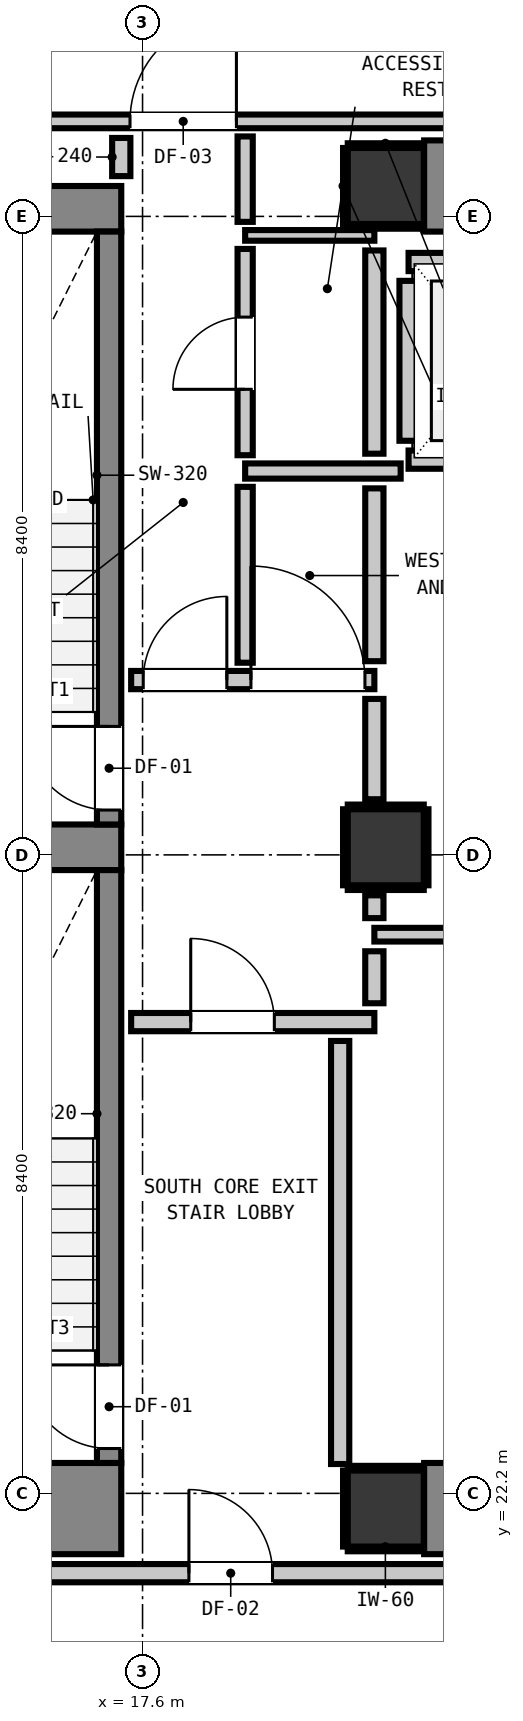
"""IFC4 building model, lengths in metres.
Left out: names, types, materials, properties, quantities, classifications, styles, units other than length and angle.
Written with IfcOpenShell. Run it as: python <this file> out.ifc"""

import sys

from ifc_helpers import new_model, si_unit, direction, frame, frame_2d, origin, origin_2d, place, context, subcontext, project, spatial, rectangle, extrude, element, fill, save


model = new_model("IFC4")
c1 = context("Model", 3, precision=1e-05, world=origin(), true_north=direction((0.0, 1.0)))
c2 = subcontext(c1, "Body", "Model", "MODEL_VIEW")
j1 = project(units=[si_unit("LENGTHUNIT", "METRE"), si_unit("PLANEANGLEUNIT", "RADIAN")], contexts=[c1])
p1 = place(None, origin())
s1 = spatial("IfcSite", under=j1, at=p1, CompositionType="ELEMENT")
p2 = place(p1, origin())
s2 = spatial("IfcBuilding", under=s1, at=p2, CompositionType="ELEMENT")
p3 = place(p2, frame((0.0, 0.0, 51.88)))
s3 = spatial("IfcBuildingStorey", under=s2, at=p3, CompositionType="ELEMENT", Elevation=51.88)
for number, where, z_axis, x_axis in (
    (1, (20.8, 22.0, 0.0), (0.0, 0.0, 1.0), (1.0, 0.0, 0.0)),
    (2, (20.8, 39.4, 0.0), (0.0, 0.0, 1.0), (1.0, 0.0, 0.0)),
):
    element("IfcColumn", number, at=place(p3, frame(where, z_axis=z_axis, x_axis=x_axis)), inside=s3, PredefinedType="COLUMN", context=c2, shape_type="SweptSolid", body=[
        extrude(rectangle(XDim=1.0, YDim=1.0, at=origin_2d()), origin(), (0.0, 0.0, 1.0), 3.32),
    ])
p4 = place(p3, frame((13.24, 22.0, 0.0), z_axis=(0.0, 0.0, 1.0), x_axis=(1.0, 0.0, 0.0)))
e3 = element("IfcWall", 3, at=p4, inside=s3, PredefinedType="SHEAR", context=c2, shape_type="SweptSolid", body=[
    extrude(rectangle(XDim=4.08, YDim=1.2, at=frame_2d((2.04, 0.0))), origin(), (0.0, 0.0, 1.0), 3.32),
])
p5 = place(p3, frame((13.24, 39.1, 0.0), z_axis=(0.0, 0.0, 1.0), x_axis=(1.0, 0.0, 0.0)))
e4 = element("IfcWall", 4, at=p5, inside=s3, PredefinedType="SHEAR", context=c2, shape_type="SweptSolid", body=[
    extrude(rectangle(XDim=4.08, YDim=0.6, at=frame_2d((2.04, 0.0))), origin(), (0.0, 0.0, 1.0), 3.32),
])
p6 = place(p3, frame((13.905, 30.7, 0.0), z_axis=(0.0, 0.0, 1.0), x_axis=(1.0, 0.0, 0.0)))
e5 = element("IfcWall", 5, at=p6, inside=s3, PredefinedType="SHEAR", context=c2, shape_type="SweptSolid", body=[
    extrude(rectangle(XDim=3.415, YDim=0.6, at=frame_2d((1.708, 0.0))), origin(), (0.0, 0.0, 1.0), 3.32),
])
for number, where, z_axis, x_axis in (
    (6, (21.305, 22.0, 0.0), (0.0, 0.0, 1.0), (1.0, 0.0, 0.0)),
    (7, (21.305, 39.4, 0.0), (0.0, 0.0, 1.0), (1.0, 0.0, 0.0)),
):
    element("IfcWall", number, at=place(p3, frame(where, z_axis=z_axis, x_axis=x_axis)), inside=s3, PredefinedType="SHEAR", context=c2, shape_type="SweptSolid", body=[
        extrude(rectangle(XDim=7.39, YDim=1.2, at=frame_2d((3.695, 0.0))), origin(), (0.0, 0.0, 1.0), 3.32),
    ])
p7 = place(p3, frame((17.16, 31.0, 0.0), z_axis=(0.0, 0.0, 1.0), x_axis=(0.0, 1.0, 0.0)))
e8 = element("IfcWall", 8, at=p7, inside=s3, PredefinedType="SHEAR", context=c2, shape_type="SweptSolid", body=[
    extrude(rectangle(XDim=7.8, YDim=0.32, at=frame_2d((3.9, 0.0))), origin(), (0.0, 0.0, 1.0), 3.32),
])
p8 = place(p7, frame((0.19, 0.0, 0.0)))
e9 = element("IfcOpeningElement", 9, at=p8, cuts=e8, PredefinedType="OPENING", context=c2, shape_type="SweptSolid", body=[
    extrude(rectangle(XDim=1.1, YDim=2.15, at=frame_2d((0.55, 1.075))), frame((0.0, 0.17, 0.0), z_axis=(0.0, -1.0, 0.0), x_axis=(1.0, 0.0, 0.0)), (0.0, 0.0, 1.0), 0.34),
])
p9 = place(p3, frame((17.16, 22.6, 0.0), z_axis=(0.0, 0.0, 1.0), x_axis=(0.0, 1.0, 0.0)))
e10 = element("IfcWall", 10, at=p9, inside=s3, PredefinedType="SHEAR", context=c2, shape_type="SweptSolid", body=[
    extrude(rectangle(XDim=7.8, YDim=0.32, at=frame_2d((3.9, 0.0))), origin(), (0.0, 0.0, 1.0), 3.32),
])
p10 = place(p9, frame((0.19, 0.0, 0.0)))
e11 = element("IfcOpeningElement", 11, at=p10, cuts=e10, PredefinedType="OPENING", context=c2, shape_type="SweptSolid", body=[
    extrude(rectangle(XDim=1.1, YDim=2.15, at=frame_2d((0.55, 1.075))), frame((0.0, 0.17, 0.0), z_axis=(0.0, -1.0, 0.0), x_axis=(1.0, 0.0, 0.0)), (0.0, 0.0, 1.0), 0.34),
])
p11 = place(p3, frame((20.8, 30.7, 0.0), z_axis=(0.0, 0.0, 1.0), x_axis=(1.0, 0.0, 0.0)))
e12 = element("IfcColumn", 12, at=p11, inside=s3, PredefinedType="COLUMN", context=c2, shape_type="SweptSolid", body=[
    extrude(rectangle(XDim=1.0, YDim=1.0, at=origin_2d()), origin(), (0.0, 0.0, 1.0), 3.32),
])
for number, where, z_axis, x_axis in (
    (13, (21.1, 35.8, 0.0), (0.0, 0.0, 1.0), (1.0, 0.0, 0.0)),
    (14, (21.1, 38.4, 0.0), (0.0, 0.0, 1.0), (1.0, 0.0, 0.0)),
):
    element("IfcWall", number, at=place(p3, frame(where, z_axis=z_axis, x_axis=x_axis)), inside=s3, PredefinedType="PARTITIONING", context=c2, shape_type="SweptSolid", body=[
        extrude(rectangle(XDim=2.2, YDim=0.24, at=frame_2d((1.1, 0.0))), origin(), (0.0, 0.0, 1.0), 3.06),
    ])
p12 = place(p3, frame((21.1, 36.048, 0.0), z_axis=(0.0, 0.0, 1.0), x_axis=(0.0, 1.0, 0.0)))
e15 = element("IfcWall", 15, at=p12, inside=s3, PredefinedType="PARTITIONING", context=c2, shape_type="SweptSolid", body=[
    extrude(rectangle(XDim=2.104, YDim=0.24, at=frame_2d((1.052, 0.0))), origin(), (0.0, 0.0, 1.0), 2.295),
])
p13 = place(p3, frame((10.15, 21.15, 0.0), z_axis=(0.0, 0.0, 1.0), x_axis=(1.0, 0.0, 0.0)))
e16 = element("IfcWall", 16, at=p13, inside=s3, PredefinedType="PARTITIONING", context=c2, shape_type="SweptSolid", body=[
    extrude(rectangle(XDim=40.023, YDim=0.24, at=frame_2d((20.012, 0.0))), origin(), (0.0, 0.0, 1.0), 3.06),
])
p14 = place(p13, frame((8.06, 0.0, 0.0)))
e17 = element("IfcOpeningElement", 17, at=p14, cuts=e16, PredefinedType="OPENING", context=c2, shape_type="SweptSolid", body=[
    extrude(rectangle(XDim=1.1, YDim=2.15, at=frame_2d((0.55, 1.075))), frame((0.0, 0.13, 0.0), z_axis=(0.0, -1.0, 0.0), x_axis=(1.0, 0.0, 0.0)), (0.0, 0.0, 1.0), 0.26),
])
p15 = place(p13, frame((0.324, 0.0, 0.0)))
e18 = element("IfcOpeningElement", 18, at=p15, cuts=e16, PredefinedType="OPENING", context=c2, shape_type="SweptSolid", body=[
    extrude(rectangle(XDim=1.4, YDim=2.15, at=frame_2d((0.7, 1.075))), frame((0.0, 0.13, 0.0), z_axis=(0.0, -1.0, 0.0), x_axis=(1.0, 0.0, 0.0)), (0.0, 0.0, 1.0), 0.26),
])
p16 = place(p13, frame((33.351, 0.0, 0.0)))
e19 = element("IfcOpeningElement", 19, at=p16, cuts=e16, PredefinedType="OPENING", context=c2, shape_type="SweptSolid", body=[
    extrude(rectangle(XDim=0.9, YDim=2.1, at=frame_2d((0.45, 1.05))), frame((0.0, 0.13, 0.0), z_axis=(0.0, -1.0, 0.0), x_axis=(1.0, 0.0, 0.0)), (0.0, 0.0, 1.0), 0.26),
])
p17 = place(p3, frame((17.45, 28.4, 0.0), z_axis=(0.0, 0.0, 1.0), x_axis=(1.0, 0.0, 0.0)))
e20 = element("IfcWall", 20, at=p17, inside=s3, PredefinedType="PARTITIONING", context=c2, shape_type="SweptSolid", body=[
    extrude(rectangle(XDim=3.2, YDim=0.24, at=frame_2d((1.6, 0.0))), origin(), (0.0, 0.0, 1.0), 3.06),
])
p18 = place(p17, frame((0.784, 0.0, 0.0)))
e21 = element("IfcOpeningElement", 21, at=p18, cuts=e20, PredefinedType="OPENING", context=c2, shape_type="SweptSolid", body=[
    extrude(rectangle(XDim=1.1, YDim=2.15, at=frame_2d((0.55, 1.075))), frame((0.0, 0.13, 0.0), z_axis=(0.0, -1.0, 0.0), x_axis=(1.0, 0.0, 0.0)), (0.0, 0.0, 1.0), 0.26),
])
p19 = place(p3, frame((17.45, 32.9, 0.0), z_axis=(0.0, 0.0, 1.0), x_axis=(1.0, 0.0, 0.0)))
e22 = element("IfcWall", 22, at=p19, inside=s3, PredefinedType="PARTITIONING", context=c2, shape_type="SweptSolid", body=[
    extrude(rectangle(XDim=3.2, YDim=0.24, at=frame_2d((1.6, 0.0))), origin(), (0.0, 0.0, 1.0), 3.06),
])
p20 = place(p19, frame((0.159, 0.0, 0.0)))
e23 = element("IfcOpeningElement", 23, at=p20, cuts=e22, PredefinedType="OPENING", context=c2, shape_type="SweptSolid", body=[
    extrude(rectangle(XDim=1.1, YDim=2.15, at=frame_2d((0.55, 1.075))), frame((0.0, 0.13, 0.0), z_axis=(0.0, -1.0, 0.0), x_axis=(1.0, 0.0, 0.0)), (0.0, 0.0, 1.0), 0.26),
])
p21 = place(p19, frame((1.576, 0.0, 0.0)))
e24 = element("IfcOpeningElement", 24, at=p21, cuts=e22, PredefinedType="OPENING", context=c2, shape_type="SweptSolid", body=[
    extrude(rectangle(XDim=1.5, YDim=2.15, at=frame_2d((0.75, 1.075))), frame((0.0, 0.13, 0.0), z_axis=(0.0, -1.0, 0.0), x_axis=(1.0, 0.0, 0.0)), (0.0, 0.0, 1.0), 0.26),
])
p22 = place(p3, frame((18.95, 35.65, 0.0), z_axis=(0.0, 0.0, 1.0), x_axis=(1.0, 0.0, 0.0)))
e25 = element("IfcWall", 25, at=p22, inside=s3, PredefinedType="PARTITIONING", context=c2, shape_type="SweptSolid", body=[
    extrude(rectangle(XDim=2.046, YDim=0.2, at=frame_2d((1.023, 0.0))), origin(), (0.0, 0.0, 1.0), 3.06),
])
p23 = place(p3, frame((20.65, 29.55, 0.0), z_axis=(0.0, 0.0, 1.0), x_axis=(1.0, 0.0, 0.0)))
e26 = element("IfcWall", 26, at=p23, inside=s3, PredefinedType="PARTITIONING", context=c2, shape_type="SweptSolid", body=[
    extrude(rectangle(XDim=9.325, YDim=0.18, at=frame_2d((4.663, 0.0))), origin(), (0.0, 0.0, 1.0), 3.06),
])
p24 = place(p3, frame((10.15, 40.25, 0.0), z_axis=(0.0, 0.0, 1.0), x_axis=(1.0, 0.0, 0.0)))
e27 = element("IfcWall", 27, at=p24, inside=s3, PredefinedType="PARTITIONING", context=c2, shape_type="SweptSolid", body=[
    extrude(rectangle(XDim=26.782, YDim=0.18, at=frame_2d((13.391, 0.0))), origin(), (0.0, 0.0, 1.0), 3.06),
])
p25 = place(p24, frame((7.285, 0.0, 0.0)))
e28 = element("IfcOpeningElement", 28, at=p25, cuts=e27, PredefinedType="OPENING", context=c2, shape_type="SweptSolid", body=[
    extrude(rectangle(XDim=1.4, YDim=2.15, at=frame_2d((0.7, 1.075))), frame((0.0, 0.1, 0.0), z_axis=(0.0, -1.0, 0.0), x_axis=(1.0, 0.0, 0.0)), (0.0, 0.0, 1.0), 0.2),
])
p26 = place(p24, frame((0.324, 0.0, 0.0)))
e29 = element("IfcOpeningElement", 29, at=p26, cuts=e27, PredefinedType="OPENING", context=c2, shape_type="SweptSolid", body=[
    extrude(rectangle(XDim=1.4, YDim=2.15, at=frame_2d((0.7, 1.075))), frame((0.0, 0.1, 0.0), z_axis=(0.0, -1.0, 0.0), x_axis=(1.0, 0.0, 0.0)), (0.0, 0.0, 1.0), 0.2),
])
p27 = place(p3, frame((18.95, 38.75, 0.0), z_axis=(0.0, 0.0, 1.0), x_axis=(1.0, 0.0, 0.0)))
e30 = element("IfcWall", 30, at=p27, inside=s3, PredefinedType="PARTITIONING", context=c2, shape_type="SweptSolid", body=[
    extrude(rectangle(XDim=1.7, YDim=0.14, at=frame_2d((0.85, 0.0))), origin(), (0.0, 0.0, 1.0), 3.06),
])
p28 = place(p3, frame((17.32, 39.53, 0.0), z_axis=(0.0, 0.0, 1.0), x_axis=(0.0, 1.0, 0.0)))
e31 = element("IfcWall", 31, at=p28, inside=s3, PredefinedType="PARTITIONING", context=c2, shape_type="SweptSolid", body=[
    extrude(rectangle(XDim=0.502, YDim=0.24, at=frame_2d((0.251, 0.0))), origin(), (0.0, 0.0, 1.0), 3.06),
])
p29 = place(p3, frame((20.2, 22.586, 0.0), z_axis=(0.0, 0.0, 1.0), x_axis=(0.0, 1.0, 0.0)))
e32 = element("IfcWall", 32, at=p29, inside=s3, PredefinedType="PARTITIONING", context=c2, shape_type="SweptSolid", body=[
    extrude(rectangle(XDim=5.566, YDim=0.24, at=frame_2d((2.783, 0.0))), origin(), (0.0, 0.0, 1.0), 3.06),
])
p30 = place(p3, frame((20.65, 28.648, 0.0), z_axis=(0.0, 0.0, 1.0), x_axis=(0.0, 1.0, 0.0)))
e33 = element("IfcWall", 33, at=p30, inside=s3, PredefinedType="PARTITIONING", context=c2, shape_type="SweptSolid", body=[
    extrude(rectangle(XDim=0.684, YDim=0.24, at=frame_2d((0.342, 0.0))), origin(), (0.0, 0.0, 1.0), 2.295),
])
p31 = place(p3, frame((20.65, 29.768, 0.0), z_axis=(0.0, 0.0, 1.0), x_axis=(0.0, 1.0, 0.0)))
e34 = element("IfcWall", 34, at=p31, inside=s3, PredefinedType="PARTITIONING", context=c2, shape_type="SweptSolid", body=[
    extrude(rectangle(XDim=0.3, YDim=0.24, at=frame_2d((0.15, 0.0))), origin(), (0.0, 0.0, 1.0), 2.295),
])
p32 = place(p3, frame((20.65, 31.332, 0.0), z_axis=(0.0, 0.0, 1.0), x_axis=(0.0, 1.0, 0.0)))
e35 = element("IfcWall", 35, at=p32, inside=s3, PredefinedType="PARTITIONING", context=c2, shape_type="SweptSolid", body=[
    extrude(rectangle(XDim=1.32, YDim=0.24, at=frame_2d((0.66, 0.0))), origin(), (0.0, 0.0, 1.0), 2.295),
])
p33 = place(p3, frame((20.65, 33.148, 0.0), z_axis=(0.0, 0.0, 1.0), x_axis=(0.0, 1.0, 0.0)))
e36 = element("IfcWall", 36, at=p33, inside=s3, PredefinedType="PARTITIONING", context=c2, shape_type="SweptSolid", body=[
    extrude(rectangle(XDim=2.274, YDim=0.24, at=frame_2d((1.137, 0.0))), origin(), (0.0, 0.0, 1.0), 2.295),
])
p34 = place(p3, frame((20.65, 35.878, 0.0), z_axis=(0.0, 0.0, 1.0), x_axis=(0.0, 1.0, 0.0)))
e37 = element("IfcWall", 37, at=p34, inside=s3, PredefinedType="PARTITIONING", context=c2, shape_type="SweptSolid", body=[
    extrude(rectangle(XDim=2.674, YDim=0.24, at=frame_2d((1.337, 0.0))), origin(), (0.0, 0.0, 1.0), 2.295),
])
p35 = place(p3, frame((18.95, 33.128, 0.0), z_axis=(0.0, 0.0, 1.0), x_axis=(0.0, 1.0, 0.0)))
e38 = element("IfcWall", 38, at=p35, inside=s3, PredefinedType="PARTITIONING", context=c2, shape_type="SweptSolid", body=[
    extrude(rectangle(XDim=2.314, YDim=0.2, at=frame_2d((1.157, 0.0))), origin(), (0.0, 0.0, 1.0), 3.06),
])
p36 = place(p3, frame((18.95, 35.858, 0.0), z_axis=(0.0, 0.0, 1.0), x_axis=(0.0, 1.0, 0.0)))
e39 = element("IfcWall", 39, at=p36, inside=s3, PredefinedType="PARTITIONING", context=c2, shape_type="SweptSolid", body=[
    extrude(rectangle(XDim=2.714, YDim=0.2, at=frame_2d((1.357, 0.0))), origin(), (0.0, 0.0, 1.0), 3.06),
])
p37 = place(p36, frame((0.867, 0.0, 0.0)))
e40 = element("IfcOpeningElement", 40, at=p37, cuts=e39, PredefinedType="OPENING", context=c2, shape_type="SweptSolid", body=[
    extrude(rectangle(XDim=0.95, YDim=2.1, at=frame_2d((0.475, 1.05))), frame((0.0, 0.11, 0.0), z_axis=(0.0, -1.0, 0.0), x_axis=(1.0, 0.0, 0.0)), (0.0, 0.0, 1.0), 0.22),
])
p38 = place(p3, frame((18.95, 38.928, 0.0), z_axis=(0.0, 0.0, 1.0), x_axis=(0.0, 1.0, 0.0)))
e41 = element("IfcWall", 41, at=p38, inside=s3, PredefinedType="PARTITIONING", context=c2, shape_type="SweptSolid", body=[
    extrude(rectangle(XDim=1.124, YDim=0.2, at=frame_2d((0.562, 0.0))), origin(), (0.0, 0.0, 1.0), 3.06),
])
for number, where, z_axis, x_axis in (
    (42, (20.3, 21.468, 0.0), (0.0, 0.0, 1.0), (1.0, 0.0, 0.0)),
    (43, (20.3, 22.532, 0.0), (0.0, 0.0, 1.0), (1.0, 0.0, 0.0)),
):
    element("IfcWall", number, at=place(p3, frame(where, z_axis=z_axis, x_axis=x_axis)), inside=s3, PredefinedType="PARTITIONING", context=c2, shape_type="SweptSolid", body=[
        extrude(rectangle(XDim=0.99, YDim=0.06, at=frame_2d((0.495, 0.0))), origin(), (0.0, 0.0, 1.0), 1.45),
    ])
p39 = place(p3, frame((20.268, 21.5, 0.0), z_axis=(0.0, 0.0, 1.0), x_axis=(0.0, 1.0, 0.0)))
e44 = element("IfcWall", 44, at=p39, inside=s3, PredefinedType="PARTITIONING", context=c2, shape_type="SweptSolid", body=[
    extrude(rectangle(XDim=1.0, YDim=0.06, at=frame_2d((0.5, 0.0))), origin(), (0.0, 0.0, 1.0), 1.45),
])
for number, where, z_axis, x_axis in (
    (45, (20.3, 38.868, 0.0), (0.0, 0.0, 1.0), (1.0, 0.0, 0.0)),
    (46, (20.3, 39.932, 0.0), (0.0, 0.0, 1.0), (1.0, 0.0, 0.0)),
):
    element("IfcWall", number, at=place(p3, frame(where, z_axis=z_axis, x_axis=x_axis)), inside=s3, PredefinedType="PARTITIONING", context=c2, shape_type="SweptSolid", body=[
        extrude(rectangle(XDim=0.99, YDim=0.06, at=frame_2d((0.495, 0.0))), origin(), (0.0, 0.0, 1.0), 1.45),
    ])
for number, where, z_axis, x_axis in (
    (47, (20.268, 38.9, 0.0), (0.0, 0.0, 1.0), (0.0, 1.0, 0.0)),
    (48, (20.3, 30.168, 0.0), (0.0, 0.0, 1.0), (1.0, 0.0, 0.0)),
    (49, (20.3, 31.232, 0.0), (0.0, 0.0, 1.0), (1.0, 0.0, 0.0)),
    (50, (20.268, 30.2, 0.0), (0.0, 0.0, 1.0), (0.0, 1.0, 0.0)),
    (51, (21.332, 30.2, 0.0), (0.0, 0.0, 1.0), (0.0, 1.0, 0.0)),
):
    element("IfcWall", number, at=place(p3, frame(where, z_axis=z_axis, x_axis=x_axis)), inside=s3, PredefinedType="PARTITIONING", context=c2, shape_type="SweptSolid", body=[
        extrude(rectangle(XDim=1.0, YDim=0.06, at=frame_2d((0.5, 0.0))), origin(), (0.0, 0.0, 1.0), 1.45),
    ])
p40 = place(p8, origin())
e52 = element("IfcDoor", 52, at=p40, inside=s3, OperationType="SINGLE_SWING_RIGHT", PredefinedType="DOOR", context=c2, shape_type="SweptSolid", body=[
    extrude(rectangle(XDim=1.1, YDim=2.15, at=frame_2d((0.55, 1.075))), frame((0.0, 0.025, 0.0), z_axis=(0.0, -1.0, 0.0), x_axis=(1.0, 0.0, 0.0)), (0.0, 0.0, 1.0), 0.05),
])
fill(e9, e52)
p41 = place(p10, origin())
e53 = element("IfcDoor", 53, at=p41, inside=s3, OperationType="SINGLE_SWING_RIGHT", PredefinedType="DOOR", context=c2, shape_type="SweptSolid", body=[
    extrude(rectangle(XDim=1.1, YDim=2.15, at=frame_2d((0.55, 1.075))), frame((0.0, 0.025, 0.0), z_axis=(0.0, -1.0, 0.0), x_axis=(1.0, 0.0, 0.0)), (0.0, 0.0, 1.0), 0.05),
])
fill(e11, e53)
p42 = place(p18, origin())
e54 = element("IfcDoor", 54, at=p42, inside=s3, OperationType="SINGLE_SWING_LEFT", PredefinedType="DOOR", context=c2, shape_type="SweptSolid", body=[
    extrude(rectangle(XDim=1.1, YDim=2.15, at=frame_2d((0.55, 1.075))), frame((0.0, 0.025, 0.0), z_axis=(0.0, -1.0, 0.0), x_axis=(1.0, 0.0, 0.0)), (0.0, 0.0, 1.0), 0.05),
])
fill(e21, e54)
p43 = place(p20, origin())
e55 = element("IfcDoor", 55, at=p43, inside=s3, OperationType="SINGLE_SWING_RIGHT", PredefinedType="DOOR", context=c2, shape_type="SweptSolid", body=[
    extrude(rectangle(XDim=1.1, YDim=2.15, at=frame_2d((0.55, 1.075))), frame((0.0, 0.025, 0.0), z_axis=(0.0, -1.0, 0.0), x_axis=(1.0, 0.0, 0.0)), (0.0, 0.0, 1.0), 0.05),
])
fill(e23, e55)
p44 = place(p14, origin())
e56 = element("IfcDoor", 56, at=p44, inside=s3, OperationType="SINGLE_SWING_LEFT", PredefinedType="DOOR", context=c2, shape_type="SweptSolid", body=[
    extrude(rectangle(XDim=1.1, YDim=2.15, at=frame_2d((0.55, 1.075))), frame((0.0, 0.025, 0.0), z_axis=(0.0, -1.0, 0.0), x_axis=(1.0, 0.0, 0.0)), (0.0, 0.0, 1.0), 0.05),
])
fill(e17, e56)
p45 = place(p25, origin())
e57 = element("IfcDoor", 57, at=p45, inside=s3, OperationType="SINGLE_SWING_RIGHT", PredefinedType="DOOR", context=c2, shape_type="SweptSolid", body=[
    extrude(rectangle(XDim=1.4, YDim=2.15, at=frame_2d((0.7, 1.075))), frame((0.0, 0.025, 0.0), z_axis=(0.0, -1.0, 0.0), x_axis=(1.0, 0.0, 0.0)), (0.0, 0.0, 1.0), 0.05),
])
fill(e28, e57)
p46 = place(p21, origin())
e58 = element("IfcDoor", 58, at=p46, inside=s3, OperationType="SINGLE_SWING_LEFT", PredefinedType="DOOR", context=c2, shape_type="SweptSolid", body=[
    extrude(rectangle(XDim=1.5, YDim=2.15, at=frame_2d((0.75, 1.075))), frame((0.0, 0.025, 0.0), z_axis=(0.0, -1.0, 0.0), x_axis=(1.0, 0.0, 0.0)), (0.0, 0.0, 1.0), 0.05),
])
fill(e24, e58)
p47 = place(p37, origin())
e59 = element("IfcDoor", 59, at=p47, inside=s3, OperationType="SINGLE_SWING_LEFT", PredefinedType="DOOR", context=c2, shape_type="SweptSolid", body=[
    extrude(rectangle(XDim=0.95, YDim=2.1, at=frame_2d((0.475, 1.05))), frame((0.0, 0.025, 0.0), z_axis=(0.0, -1.0, 0.0), x_axis=(1.0, 0.0, 0.0)), (0.0, 0.0, 1.0), 0.05),
])
fill(e40, e59)
save(model, sys.argv[1])
